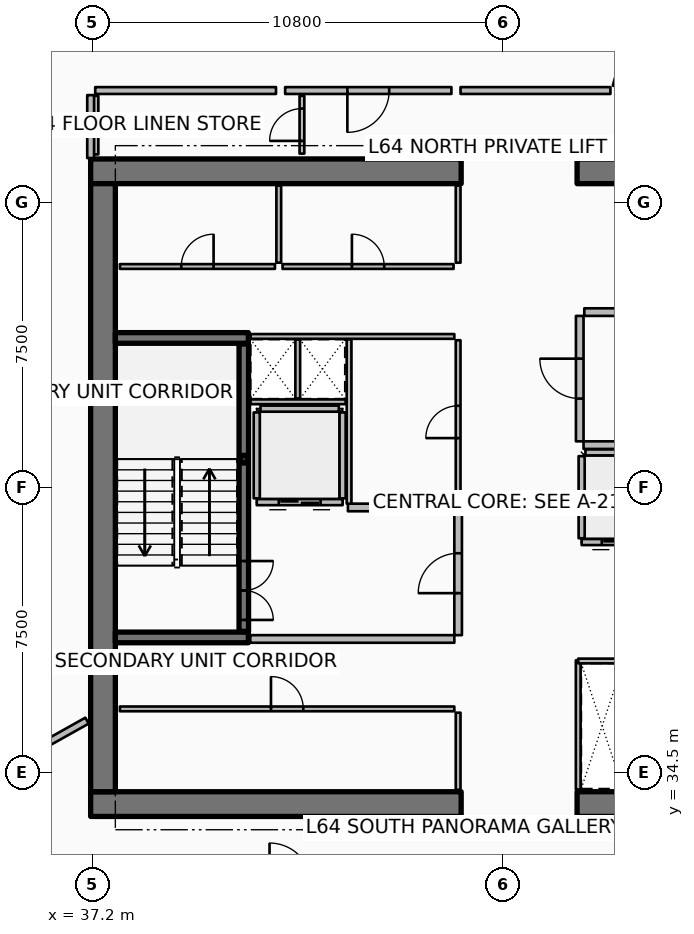
"""IFC4 building model, lengths in metres.
Left out: names, types, materials, properties, quantities, classifications, styles, units other than length and angle.
Written with IfcOpenShell. Run it as: python <this file> out.ifc"""

import sys

from ifc_helpers import new_model, si_unit, direction, frame, frame_2d, origin, origin_2d, place, context, subcontext, project, spatial, rectangle, hollow_rectangle, extrude, element, fill, save


model = new_model("IFC4")
c1 = context("Model", 3, precision=1e-05, world=origin(), true_north=direction((0.0, 1.0)))
c2 = subcontext(c1, "Body", "Model", "MODEL_VIEW")
j1 = project(units=[si_unit("LENGTHUNIT", "METRE"), si_unit("PLANEANGLEUNIT", "RADIAN")], contexts=[c1])
p1 = place(None, origin())
s1 = spatial("IfcSite", under=j1, at=p1, CompositionType="ELEMENT")
p2 = place(p1, origin())
s2 = spatial("IfcBuilding", under=s1, at=p2, CompositionType="ELEMENT")
p3 = place(p2, frame((0.0, 0.0, 255.95)))
s3 = spatial("IfcBuildingStorey", under=s2, at=p3, CompositionType="ELEMENT", Elevation=255.95)
for number, where, z_axis, x_axis in (
    (1, (37.15, 33.675, 0.0), (0.0, 0.0, 1.0), (1.0, 0.0, 0.0)),
    (2, (49.95, 33.675, 0.0), (0.0, 0.0, 1.0), (1.0, 0.0, 0.0)),
    (3, (37.15, 50.325, 0.0), (0.0, 0.0, 1.0), (1.0, 0.0, 0.0)),
    (4, (49.95, 50.325, 0.0), (0.0, 0.0, 1.0), (1.0, 0.0, 0.0)),
):
    element("IfcWall", number, at=place(p3, frame(where, z_axis=z_axis, x_axis=x_axis)), inside=s3, PredefinedType="SHEAR", context=c2, shape_type="SweptSolid", body=[
        extrude(rectangle(XDim=9.75, YDim=0.65, at=frame_2d((4.875, 0.0))), origin(), (0.0, 0.0, 1.0), 3.85),
    ])
p4 = place(p3, frame((37.475, 34.0, 0.0), z_axis=(0.0, 0.0, 1.0), x_axis=(0.0, 1.0, 0.0)))
e5 = element("IfcWall", 5, at=p4, inside=s3, PredefinedType="SHEAR", context=c2, shape_type="SweptSolid", body=[
    extrude(rectangle(XDim=16.0, YDim=0.65, at=frame_2d((8.0, 0.0))), origin(), (0.0, 0.0, 1.0), 3.85),
])
for number, where, z_axis, x_axis in (
    (6, (37.8, 38.06, 0.0), (0.0, 0.0, 1.0), (1.0, 0.0, 0.0)),
    (7, (37.8, 45.94, 0.0), (0.0, 0.0, 1.0), (1.0, 0.0, 0.0)),
):
    element("IfcWall", number, at=place(p3, frame(where, z_axis=z_axis, x_axis=x_axis)), inside=s3, PredefinedType="SHEAR", context=c2, shape_type="SweptSolid", body=[
        extrude(rectangle(XDim=3.5, YDim=0.28, at=frame_2d((1.75, 0.0))), origin(), (0.0, 0.0, 1.0), 3.85),
    ])
p5 = place(p3, frame((41.18, 42.75, 0.0), z_axis=(0.0, 0.0, 1.0), x_axis=(1.0, 0.0, 0.0)))
e8 = element("IfcColumn", 8, at=p5, inside=s3, PredefinedType="COLUMN", context=c2, shape_type="SweptSolid", body=[
    extrude(hollow_rectangle(XDim=0.2, YDim=0.2, WallThickness=0.01, InnerFilletRadius=0.01, OuterFilletRadius=0.02, at=origin_2d()), origin(), (0.0, 0.0, 1.0), 1.72),
])
p6 = place(p3, frame((41.18, 38.22, 0.0), z_axis=(0.0, 0.0, 1.0), x_axis=(0.0, 1.0, 0.0)))
e9 = element("IfcWall", 9, at=p6, inside=s3, PredefinedType="SOLIDWALL", context=c2, shape_type="SweptSolid", body=[
    extrude(rectangle(XDim=7.56, YDim=0.25, at=frame_2d((3.78, 0.0))), origin(), (0.0, 0.0, 1.0), 3.59),
])
p7 = place(p6, frame((0.3, 0.0, 0.0)))
e10 = element("IfcOpeningElement", 10, at=p7, cuts=e9, PredefinedType="OPENING", context=c2, shape_type="SweptSolid", body=[
    extrude(rectangle(XDim=1.55, YDim=2.15, at=frame_2d((0.775, 1.075))), frame((0.0, 0.135, 0.0), z_axis=(0.0, -1.0, 0.0), x_axis=(1.0, 0.0, 0.0)), (0.0, 0.0, 1.0), 0.27),
])
p8 = place(p3, frame((43.78, 41.62, 0.0), z_axis=(0.0, 0.0, 1.0), x_axis=(-1.0, 0.0, 0.0)))
e11 = element("IfcWall", 11, at=p8, inside=s3, PredefinedType="PARTITIONING", context=c2, shape_type="SweptSolid", body=[
    extrude(rectangle(XDim=2.26, YDim=0.16, at=frame_2d((1.13, 0.0))), origin(), (0.0, 0.0, 1.0), 3.59),
])
p9 = place(p8, frame((0.58, 0.0, 0.0)))
e12 = element("IfcOpeningElement", 12, at=p9, cuts=e11, PredefinedType="OPENING", context=c2, shape_type="SweptSolid", body=[
    extrude(rectangle(XDim=1.1, YDim=2.1, at=frame_2d((0.55, 1.05))), frame((0.0, 0.09, 0.0), z_axis=(0.0, -1.0, 0.0), x_axis=(1.0, 0.0, 0.0)), (0.0, 0.0, 1.0), 0.18),
])
for number, where, z_axis, x_axis in (
    (13, (43.78, 41.72, 0.0), (0.0, 0.0, 1.0), (0.0, 1.0, 0.0)),
    (14, (41.52, 41.72, 0.0), (0.0, 0.0, 1.0), (0.0, 1.0, 0.0)),
):
    element("IfcWall", number, at=place(p3, frame(where, z_axis=z_axis, x_axis=x_axis)), inside=s3, PredefinedType="PARTITIONING", context=c2, shape_type="SweptSolid", body=[
        extrude(rectangle(XDim=2.26, YDim=0.16, at=frame_2d((1.13, 0.0))), origin(), (0.0, 0.0, 1.0), 3.59),
    ])
p10 = place(p3, frame((41.62, 44.08, 0.0), z_axis=(0.0, 0.0, 1.0), x_axis=(1.0, 0.0, 0.0)))
e15 = element("IfcWall", 15, at=p10, inside=s3, PredefinedType="PARTITIONING", context=c2, shape_type="SweptSolid", body=[
    extrude(rectangle(XDim=2.06, YDim=0.16, at=frame_2d((1.03, 0.0))), origin(), (0.0, 0.0, 1.0), 3.59),
])
p11 = place(p3, frame((52.23, 40.57, 0.0), z_axis=(0.0, 0.0, 1.0), x_axis=(-1.0, 0.0, 0.0)))
e16 = element("IfcWall", 16, at=p11, inside=s3, PredefinedType="PARTITIONING", context=c2, shape_type="SweptSolid", body=[
    extrude(rectangle(XDim=2.16, YDim=0.16, at=frame_2d((1.08, 0.0))), origin(), (0.0, 0.0, 1.0), 3.59),
])
p12 = place(p11, frame((0.53, 0.0, 0.0)))
e17 = element("IfcOpeningElement", 17, at=p12, cuts=e16, PredefinedType="OPENING", context=c2, shape_type="SweptSolid", body=[
    extrude(rectangle(XDim=1.1, YDim=2.1, at=frame_2d((0.55, 1.05))), frame((0.0, 0.09, 0.0), z_axis=(0.0, -1.0, 0.0), x_axis=(1.0, 0.0, 0.0)), (0.0, 0.0, 1.0), 0.18),
])
p13 = place(p3, frame((50.07, 40.67, 0.0), z_axis=(0.0, 0.0, 1.0), x_axis=(0.0, 1.0, 0.0)))
e18 = element("IfcWall", 18, at=p13, inside=s3, PredefinedType="PARTITIONING", context=c2, shape_type="SweptSolid", body=[
    extrude(rectangle(XDim=2.16, YDim=0.16, at=frame_2d((1.08, 0.0))), origin(), (0.0, 0.0, 1.0), 3.59),
])
p14 = place(p3, frame((50.17, 42.93, 0.0), z_axis=(0.0, 0.0, 1.0), x_axis=(1.0, 0.0, 0.0)))
e19 = element("IfcWall", 19, at=p14, inside=s3, PredefinedType="PARTITIONING", context=c2, shape_type="SweptSolid", body=[
    extrude(rectangle(XDim=1.96, YDim=0.16, at=frame_2d((0.98, 0.0))), origin(), (0.0, 0.0, 1.0), 3.59),
])
p15 = place(p3, frame((46.82, 34.05, 0.0), z_axis=(0.0, 0.0, 1.0), x_axis=(0.0, 1.0, 0.0)))
e20 = element("IfcWall", 20, at=p15, inside=s3, PredefinedType="PARTITIONING", context=c2, shape_type="SweptSolid", body=[
    extrude(rectangle(XDim=2.03, YDim=0.125, at=frame_2d((1.015, 0.0))), origin(), (0.0, 0.0, 1.0), 3.03),
])
p16 = place(p3, frame((37.92, 36.18, 0.0), z_axis=(0.0, 0.0, 1.0), x_axis=(1.0, 0.0, 0.0)))
e21 = element("IfcWall", 21, at=p16, inside=s3, PredefinedType="PARTITIONING", context=c2, shape_type="SweptSolid", body=[
    extrude(rectangle(XDim=8.8, YDim=0.125, at=frame_2d((4.4, 0.0))), origin(), (0.0, 0.0, 1.0), 3.03),
])
p17 = place(p16, frame((3.975, 0.0, 0.0)))
e22 = element("IfcOpeningElement", 22, at=p17, cuts=e21, PredefinedType="OPENING", context=c2, shape_type="SweptSolid", body=[
    extrude(rectangle(XDim=0.85, YDim=2.06, at=frame_2d((0.425, 1.03))), frame((0.0, 0.073, 0.0), z_axis=(0.0, -1.0, 0.0), x_axis=(1.0, 0.0, 0.0)), (0.0, 0.0, 1.0), 0.145),
])
for number, where, z_axis, x_axis in (
    (23, (46.82, 47.92, 0.0), (0.0, 0.0, 1.0), (0.0, 1.0, 0.0)),
    (24, (42.1, 47.92, 0.0), (0.0, 0.0, 1.0), (0.0, 1.0, 0.0)),
):
    element("IfcWall", number, at=place(p3, frame(where, z_axis=z_axis, x_axis=x_axis)), inside=s3, PredefinedType="PARTITIONING", context=c2, shape_type="SweptSolid", body=[
        extrude(rectangle(XDim=2.03, YDim=0.125, at=frame_2d((1.015, 0.0))), origin(), (0.0, 0.0, 1.0), 3.03),
    ])
p18 = place(p3, frame((37.92, 47.82, 0.0), z_axis=(0.0, 0.0, 1.0), x_axis=(1.0, 0.0, 0.0)))
e25 = element("IfcWall", 25, at=p18, inside=s3, PredefinedType="PARTITIONING", context=c2, shape_type="SweptSolid", body=[
    extrude(rectangle(XDim=4.08, YDim=0.125, at=frame_2d((2.04, 0.0))), origin(), (0.0, 0.0, 1.0), 3.03),
])
p19 = place(p18, frame((1.615, 0.0, 0.0)))
e26 = element("IfcOpeningElement", 26, at=p19, cuts=e25, PredefinedType="OPENING", context=c2, shape_type="SweptSolid", body=[
    extrude(rectangle(XDim=0.85, YDim=2.06, at=frame_2d((0.425, 1.03))), frame((0.0, 0.073, 0.0), z_axis=(0.0, -1.0, 0.0), x_axis=(1.0, 0.0, 0.0)), (0.0, 0.0, 1.0), 0.145),
])
p20 = place(p3, frame((42.2, 47.82, 0.0), z_axis=(0.0, 0.0, 1.0), x_axis=(1.0, 0.0, 0.0)))
e27 = element("IfcWall", 27, at=p20, inside=s3, PredefinedType="PARTITIONING", context=c2, shape_type="SweptSolid", body=[
    extrude(rectangle(XDim=4.5, YDim=0.125, at=frame_2d((2.25, 0.0))), origin(), (0.0, 0.0, 1.0), 3.03),
])
p21 = place(p20, frame((1.825, 0.0, 0.0)))
e28 = element("IfcOpeningElement", 28, at=p21, cuts=e27, PredefinedType="OPENING", context=c2, shape_type="SweptSolid", body=[
    extrude(rectangle(XDim=0.85, YDim=2.06, at=frame_2d((0.425, 1.03))), frame((0.0, 0.073, 0.0), z_axis=(0.0, -1.0, 0.0), x_axis=(1.0, 0.0, 0.0)), (0.0, 0.0, 1.0), 0.145),
])
p22 = place(p3, frame((41.35, 38.02, 0.0), z_axis=(0.0, 0.0, 1.0), x_axis=(1.0, 0.0, 0.0)))
e29 = element("IfcWall", 29, at=p22, inside=s3, PredefinedType="PARTITIONING", context=c2, shape_type="SweptSolid", body=[
    extrude(rectangle(XDim=5.37, YDim=0.2, at=frame_2d((2.685, 0.0))), origin(), (0.0, 0.0, 1.0), 3.59),
])
p23 = place(p3, frame((43.92, 41.48, 0.0), z_axis=(0.0, 0.0, 1.0), x_axis=(1.0, 0.0, 0.0)))
e30 = element("IfcWall", 30, at=p23, inside=s3, PredefinedType="PARTITIONING", context=c2, shape_type="SweptSolid", body=[
    extrude(rectangle(XDim=2.8, YDim=0.2, at=frame_2d((1.4, 0.0))), origin(), (0.0, 0.0, 1.0), 3.59),
])
p24 = place(p3, frame((46.82, 38.12, 0.0), z_axis=(0.0, 0.0, 1.0), x_axis=(0.0, 1.0, 0.0)))
e31 = element("IfcWall", 31, at=p24, inside=s3, PredefinedType="PARTITIONING", context=c2, shape_type="SweptSolid", body=[
    extrude(rectangle(XDim=3.26, YDim=0.2, at=frame_2d((1.63, 0.0))), origin(), (0.0, 0.0, 1.0), 3.59),
])
p25 = place(p24, frame((1.105, 0.0, 0.0)))
e32 = element("IfcOpeningElement", 32, at=p25, cuts=e31, PredefinedType="OPENING", context=c2, shape_type="SweptSolid", body=[
    extrude(rectangle(XDim=1.05, YDim=2.1, at=frame_2d((0.525, 1.05))), frame((0.0, 0.11, 0.0), z_axis=(0.0, -1.0, 0.0), x_axis=(1.0, 0.0, 0.0)), (0.0, 0.0, 1.0), 0.22),
])
p26 = place(p3, frame((50.12, 43.12, 0.0), z_axis=(0.0, 0.0, 1.0), x_axis=(1.0, 0.0, 0.0)))
e33 = element("IfcWall", 33, at=p26, inside=s3, PredefinedType="PARTITIONING", context=c2, shape_type="SweptSolid", body=[
    extrude(rectangle(XDim=8.88, YDim=0.2, at=frame_2d((4.44, 0.0))), origin(), (0.0, 0.0, 1.0), 3.59),
])
p27 = place(p3, frame((50.14, 46.62, 0.0), z_axis=(0.0, 0.0, 1.0), x_axis=(1.0, 0.0, 0.0)))
e34 = element("IfcWall", 34, at=p27, inside=s3, PredefinedType="PARTITIONING", context=c2, shape_type="SweptSolid", body=[
    extrude(rectangle(XDim=1.02, YDim=0.2, at=frame_2d((0.51, 0.0))), origin(), (0.0, 0.0, 1.0), 3.59),
])
p28 = place(p3, frame((50.02, 43.22, 0.0), z_axis=(0.0, 0.0, 1.0), x_axis=(0.0, 1.0, 0.0)))
e35 = element("IfcWall", 35, at=p28, inside=s3, PredefinedType="PARTITIONING", context=c2, shape_type="SweptSolid", body=[
    extrude(rectangle(XDim=3.3, YDim=0.2, at=frame_2d((1.65, 0.0))), origin(), (0.0, 0.0, 1.0), 3.59),
])
p29 = place(p28, frame((1.125, 0.0, 0.0)))
e36 = element("IfcOpeningElement", 36, at=p29, cuts=e35, PredefinedType="OPENING", context=c2, shape_type="SweptSolid", body=[
    extrude(rectangle(XDim=1.05, YDim=2.1, at=frame_2d((0.525, 1.05))), frame((0.0, 0.11, 0.0), z_axis=(0.0, -1.0, 0.0), x_axis=(1.0, 0.0, 0.0)), (0.0, 0.0, 1.0), 0.22),
])
p30 = place(p3, frame((41.36, 45.98, 0.0), z_axis=(0.0, 0.0, 1.0), x_axis=(1.0, 0.0, 0.0)))
e37 = element("IfcWall", 37, at=p30, inside=s3, PredefinedType="PARTITIONING", context=c2, shape_type="SweptSolid", body=[
    extrude(rectangle(XDim=5.36, YDim=0.125, at=frame_2d((2.68, 0.0))), origin(), (0.0, 0.0, 1.0), 3.03),
])
p31 = place(p3, frame((41.36, 44.26, 0.0), z_axis=(0.0, 0.0, 1.0), x_axis=(1.0, 0.0, 0.0)))
e38 = element("IfcWall", 38, at=p31, inside=s3, PredefinedType="PARTITIONING", context=c2, shape_type="SweptSolid", body=[
    extrude(rectangle(XDim=2.5, YDim=0.125, at=frame_2d((1.25, 0.0))), origin(), (0.0, 0.0, 1.0), 3.03),
])
p32 = place(p3, frame((42.6, 44.35, 0.0), z_axis=(0.0, 0.0, 1.0), x_axis=(0.0, 1.0, 0.0)))
e39 = element("IfcWall", 39, at=p32, inside=s3, PredefinedType="PARTITIONING", context=c2, shape_type="SweptSolid", body=[
    extrude(rectangle(XDim=1.55, YDim=0.125, at=frame_2d((0.775, 0.0))), origin(), (0.0, 0.0, 1.0), 3.03),
])
p33 = place(p3, frame((49.98, 34.06, 0.0), z_axis=(0.0, 0.0, 1.0), x_axis=(0.0, 1.0, 0.0)))
e40 = element("IfcWall", 40, at=p33, inside=s3, PredefinedType="PARTITIONING", context=c2, shape_type="SweptSolid", body=[
    extrude(rectangle(XDim=3.4, YDim=0.125, at=frame_2d((1.7, 0.0))), origin(), (0.0, 0.0, 1.0), 3.03),
])
p34 = place(p3, frame((49.98, 37.44, 0.0), z_axis=(0.0, 0.0, 1.0), x_axis=(1.0, 0.0, 0.0)))
e41 = element("IfcWall", 41, at=p34, inside=s3, PredefinedType="PARTITIONING", context=c2, shape_type="SweptSolid", body=[
    extrude(rectangle(XDim=1.26, YDim=0.125, at=frame_2d((0.63, 0.0))), origin(), (0.0, 0.0, 1.0), 3.03),
])
p35 = place(p3, frame((43.95, 41.58, 0.0), z_axis=(0.0, 0.0, 1.0), x_axis=(0.0, 1.0, 0.0)))
e42 = element("IfcWall", 42, at=p35, inside=s3, PredefinedType="PARTITIONING", context=c2, shape_type="SweptSolid", body=[
    extrude(rectangle(XDim=4.32, YDim=0.125, at=frame_2d((2.16, 0.0))), origin(), (0.0, 0.0, 1.0), 3.03),
])
p36 = place(p3, frame((46.82, 41.58, 0.0), z_axis=(0.0, 0.0, 1.0), x_axis=(0.0, 1.0, 0.0)))
e43 = element("IfcWall", 43, at=p36, inside=s3, PredefinedType="PARTITIONING", context=c2, shape_type="SweptSolid", body=[
    extrude(rectangle(XDim=4.3, YDim=0.125, at=frame_2d((2.15, 0.0))), origin(), (0.0, 0.0, 1.0), 3.03),
])
p37 = place(p36, frame((1.725, 0.0, 0.0)))
e44 = element("IfcOpeningElement", 44, at=p37, cuts=e43, PredefinedType="OPENING", context=c2, shape_type="SweptSolid", body=[
    extrude(rectangle(XDim=0.85, YDim=2.06, at=frame_2d((0.425, 1.03))), frame((0.0, 0.073, 0.0), z_axis=(0.0, -1.0, 0.0), x_axis=(1.0, 0.0, 0.0)), (0.0, 0.0, 1.0), 0.145),
])
p38 = place(p3, frame((37.29, 50.77, 0.0), z_axis=(0.0, 0.0, 1.0), x_axis=(0.0, 1.0, 0.0)))
e45 = element("IfcWall", 45, at=p38, inside=s3, PredefinedType="PARTITIONING", context=c2, shape_type="SweptSolid", body=[
    extrude(rectangle(XDim=1.54, YDim=0.125, at=frame_2d((0.77, 0.0))), origin(), (0.0, 0.0, 1.0), 3.03),
])
p39 = place(p3, frame((42.71, 50.79, 0.0), z_axis=(0.0, 0.0, 1.0), x_axis=(0.0, 1.0, 0.0)))
e46 = element("IfcWall", 46, at=p39, inside=s3, PredefinedType="PARTITIONING", context=c2, shape_type="SweptSolid", body=[
    extrude(rectangle(XDim=1.52, YDim=0.125, at=frame_2d((0.76, 0.0))), origin(), (0.0, 0.0, 1.0), 2.957),
])
p40 = place(p39, frame((0.335, 0.0, 0.0)))
e47 = element("IfcOpeningElement", 47, at=p40, cuts=e46, PredefinedType="OPENING", context=c2, shape_type="SweptSolid", body=[
    extrude(rectangle(XDim=0.85, YDim=2.06, at=frame_2d((0.425, 1.03))), frame((0.0, 0.073, 0.0), z_axis=(0.0, -1.0, 0.0), x_axis=(1.0, 0.0, 0.0)), (0.0, 0.0, 1.0), 0.145),
])
p41 = place(p3, frame((50.977, 52.556, 0.0), z_axis=(0.0, 0.0, 1.0), x_axis=(0.271442063103, 0.962454781472, 0.0)))
e48 = element("IfcWall", 48, at=p41, inside=s3, PredefinedType="PARTITIONING", context=c2, shape_type="SweptSolid", body=[
    extrude(rectangle(XDim=16.017, YDim=0.18, at=frame_2d((8.008, 0.0))), origin(), (0.0, 0.0, 1.0), 2.957),
])
p42 = place(p3, frame((37.054, 35.87, 0.0), z_axis=(0.0, 0.0, 1.0), x_axis=(-0.872490186067, -0.488631635506, 0.0)))
e49 = element("IfcWall", 49, at=p42, inside=s3, PredefinedType="PARTITIONING", context=c2, shape_type="SweptSolid", body=[
    extrude(rectangle(XDim=17.884, YDim=0.18, at=frame_2d((8.942, 0.0))), origin(), (0.0, 0.0, 1.0), 2.957),
])
p43 = place(p3, frame((46.643, 52.45, 0.0), z_axis=(0.0, 0.0, 1.0), x_axis=(-1.0, 0.0, 0.0)))
e50 = element("IfcWall", 50, at=p43, inside=s3, PredefinedType="PARTITIONING", context=c2, shape_type="SweptSolid", body=[
    extrude(rectangle(XDim=4.376, YDim=0.18, at=frame_2d((2.188, 0.0))), origin(), (0.0, 0.0, 1.0), 2.957),
])
p44 = place(p43, frame((1.638, 0.0, 0.0)))
e51 = element("IfcOpeningElement", 51, at=p44, cuts=e50, PredefinedType="OPENING", context=c2, shape_type="SweptSolid", body=[
    extrude(rectangle(XDim=1.1, YDim=2.1, at=frame_2d((0.55, 1.05))), frame((0.0, 0.1, 0.0), z_axis=(0.0, -1.0, 0.0), x_axis=(1.0, 0.0, 0.0)), (0.0, 0.0, 1.0), 0.2),
])
p45 = place(p3, frame((50.827, 52.45, 0.0), z_axis=(0.0, 0.0, 1.0), x_axis=(-1.0, 0.0, 0.0)))
e52 = element("IfcWall", 52, at=p45, inside=s3, PredefinedType="PARTITIONING", context=c2, shape_type="SweptSolid", body=[
    extrude(rectangle(XDim=3.944, YDim=0.18, at=frame_2d((1.972, 0.0))), origin(), (0.0, 0.0, 1.0), 2.957),
])
p46 = place(p3, frame((42.028, 52.45, 0.0), z_axis=(0.0, 0.0, 1.0), x_axis=(-1.0, 0.0, 0.0)))
e53 = element("IfcWall", 53, at=p46, inside=s3, PredefinedType="PARTITIONING", context=c2, shape_type="SweptSolid", body=[
    extrude(rectangle(XDim=4.758, YDim=0.18, at=frame_2d((2.379, 0.0))), origin(), (0.0, 0.0, 1.0), 2.957),
])
p47 = place(p3, frame((37.15, 52.33, 0.0), z_axis=(0.0, 0.0, 1.0), x_axis=(0.0, -1.0, 0.0)))
e54 = element("IfcWall", 54, at=p47, inside=s3, PredefinedType="PARTITIONING", context=c2, shape_type="SweptSolid", body=[
    extrude(rectangle(XDim=1.656, YDim=0.18, at=frame_2d((0.828, 0.0))), origin(), (0.0, 0.0, 1.0), 2.957),
])
p48 = place(p3, frame((39.095, 57.681, 0.0), z_axis=(0.0, 0.0, 1.0), x_axis=(-0.760396866349, -0.649458702033, 0.0)))
e55 = element("IfcWall", 55, at=p48, inside=s3, PredefinedType="PARTITIONING", context=c2, shape_type="SweptSolid", body=[
    extrude(rectangle(XDim=6.824, YDim=0.125, at=frame_2d((3.412, 0.0))), origin(), (0.0, 0.0, 1.0), 2.957),
])
p49 = place(p48, frame((2.962, 0.0, 0.0)))
e56 = element("IfcOpeningElement", 56, at=p49, cuts=e55, PredefinedType="OPENING", context=c2, shape_type="SweptSolid", body=[
    extrude(rectangle(XDim=0.9, YDim=2.08, at=frame_2d((0.45, 1.04))), frame((0.0, 0.073, 0.0), z_axis=(0.0, -1.0, 0.0), x_axis=(1.0, 0.0, 0.0)), (0.0, 0.0, 1.0), 0.145),
])
p50 = place(p7, origin())
e57 = element("IfcDoor", 57, at=p50, inside=s3, OperationType="DOUBLE_DOOR_SINGLE_SWING", PredefinedType="DOOR", context=c2, shape_type="SweptSolid", body=[
    extrude(rectangle(XDim=1.55, YDim=2.15, at=frame_2d((0.775, 1.075))), frame((0.0, 0.025, 0.0), z_axis=(0.0, -1.0, 0.0), x_axis=(1.0, 0.0, 0.0)), (0.0, 0.0, 1.0), 0.05),
])
fill(e10, e57)
p51 = place(p9, origin())
e58 = element("IfcDoor", 58, at=p51, inside=s3, OperationType="DOUBLE_DOOR_SLIDING", PredefinedType="DOOR", context=c2, shape_type="SweptSolid", body=[
    extrude(rectangle(XDim=1.1, YDim=2.1, at=frame_2d((0.55, 1.05))), frame((0.0, 0.025, 0.0), z_axis=(0.0, -1.0, 0.0), x_axis=(1.0, 0.0, 0.0)), (0.0, 0.0, 1.0), 0.05),
])
fill(e12, e58)
p52 = place(p12, origin())
e59 = element("IfcDoor", 59, at=p52, inside=s3, OperationType="DOUBLE_DOOR_SLIDING", PredefinedType="DOOR", context=c2, shape_type="SweptSolid", body=[
    extrude(rectangle(XDim=1.1, YDim=2.1, at=frame_2d((0.55, 1.05))), frame((0.0, 0.025, 0.0), z_axis=(0.0, -1.0, 0.0), x_axis=(1.0, 0.0, 0.0)), (0.0, 0.0, 1.0), 0.05),
])
fill(e17, e59)
p53 = place(p17, origin())
e60 = element("IfcDoor", 60, at=p53, inside=s3, OperationType="SINGLE_SWING_LEFT", PredefinedType="DOOR", context=c2, shape_type="SweptSolid", body=[
    extrude(rectangle(XDim=0.85, YDim=2.06, at=frame_2d((0.425, 1.03))), frame((0.0, 0.025, 0.0), z_axis=(0.0, -1.0, 0.0), x_axis=(1.0, 0.0, 0.0)), (0.0, 0.0, 1.0), 0.05),
])
fill(e22, e60)
p54 = place(p19, origin())
e61 = element("IfcDoor", 61, at=p54, inside=s3, OperationType="SINGLE_SWING_RIGHT", PredefinedType="DOOR", context=c2, shape_type="SweptSolid", body=[
    extrude(rectangle(XDim=0.85, YDim=2.06, at=frame_2d((0.425, 1.03))), frame((0.0, 0.025, 0.0), z_axis=(0.0, -1.0, 0.0), x_axis=(1.0, 0.0, 0.0)), (0.0, 0.0, 1.0), 0.05),
])
fill(e26, e61)
p55 = place(p21, origin())
e62 = element("IfcDoor", 62, at=p55, inside=s3, OperationType="SINGLE_SWING_LEFT", PredefinedType="DOOR", context=c2, shape_type="SweptSolid", body=[
    extrude(rectangle(XDim=0.85, YDim=2.06, at=frame_2d((0.425, 1.03))), frame((0.0, 0.025, 0.0), z_axis=(0.0, -1.0, 0.0), x_axis=(1.0, 0.0, 0.0)), (0.0, 0.0, 1.0), 0.05),
])
fill(e28, e62)
p56 = place(p25, origin())
e63 = element("IfcDoor", 63, at=p56, inside=s3, OperationType="SINGLE_SWING_LEFT", PredefinedType="DOOR", context=c2, shape_type="SweptSolid", body=[
    extrude(rectangle(XDim=1.05, YDim=2.1, at=frame_2d((0.525, 1.05))), frame((0.0, 0.025, 0.0), z_axis=(0.0, -1.0, 0.0), x_axis=(1.0, 0.0, 0.0)), (0.0, 0.0, 1.0), 0.05),
])
fill(e32, e63)
p57 = place(p29, origin())
e64 = element("IfcDoor", 64, at=p57, inside=s3, OperationType="SINGLE_SWING_RIGHT", PredefinedType="DOOR", context=c2, shape_type="SweptSolid", body=[
    extrude(rectangle(XDim=1.05, YDim=2.1, at=frame_2d((0.525, 1.05))), frame((0.0, 0.025, 0.0), z_axis=(0.0, -1.0, 0.0), x_axis=(1.0, 0.0, 0.0)), (0.0, 0.0, 1.0), 0.05),
])
fill(e36, e64)
p58 = place(p37, origin())
e65 = element("IfcDoor", 65, at=p58, inside=s3, OperationType="SINGLE_SWING_LEFT", PredefinedType="DOOR", context=c2, shape_type="SweptSolid", body=[
    extrude(rectangle(XDim=0.85, YDim=2.06, at=frame_2d((0.425, 1.03))), frame((0.0, 0.025, 0.0), z_axis=(0.0, -1.0, 0.0), x_axis=(1.0, 0.0, 0.0)), (0.0, 0.0, 1.0), 0.05),
])
fill(e44, e65)
p59 = place(p40, origin())
e66 = element("IfcDoor", 66, at=p59, inside=s3, OperationType="SINGLE_SWING_LEFT", PredefinedType="DOOR", context=c2, shape_type="SweptSolid", body=[
    extrude(rectangle(XDim=0.85, YDim=2.06, at=frame_2d((0.425, 1.03))), frame((0.0, 0.025, 0.0), z_axis=(0.0, -1.0, 0.0), x_axis=(1.0, 0.0, 0.0)), (0.0, 0.0, 1.0), 0.05),
])
fill(e47, e66)
p60 = place(p44, origin())
e67 = element("IfcDoor", 67, at=p60, inside=s3, OperationType="SINGLE_SWING_RIGHT", PredefinedType="DOOR", context=c2, shape_type="SweptSolid", body=[
    extrude(rectangle(XDim=1.1, YDim=2.1, at=frame_2d((0.55, 1.05))), frame((0.0, 0.025, 0.0), z_axis=(0.0, -1.0, 0.0), x_axis=(1.0, 0.0, 0.0)), (0.0, 0.0, 1.0), 0.05),
])
fill(e51, e67)
save(model, sys.argv[1])
